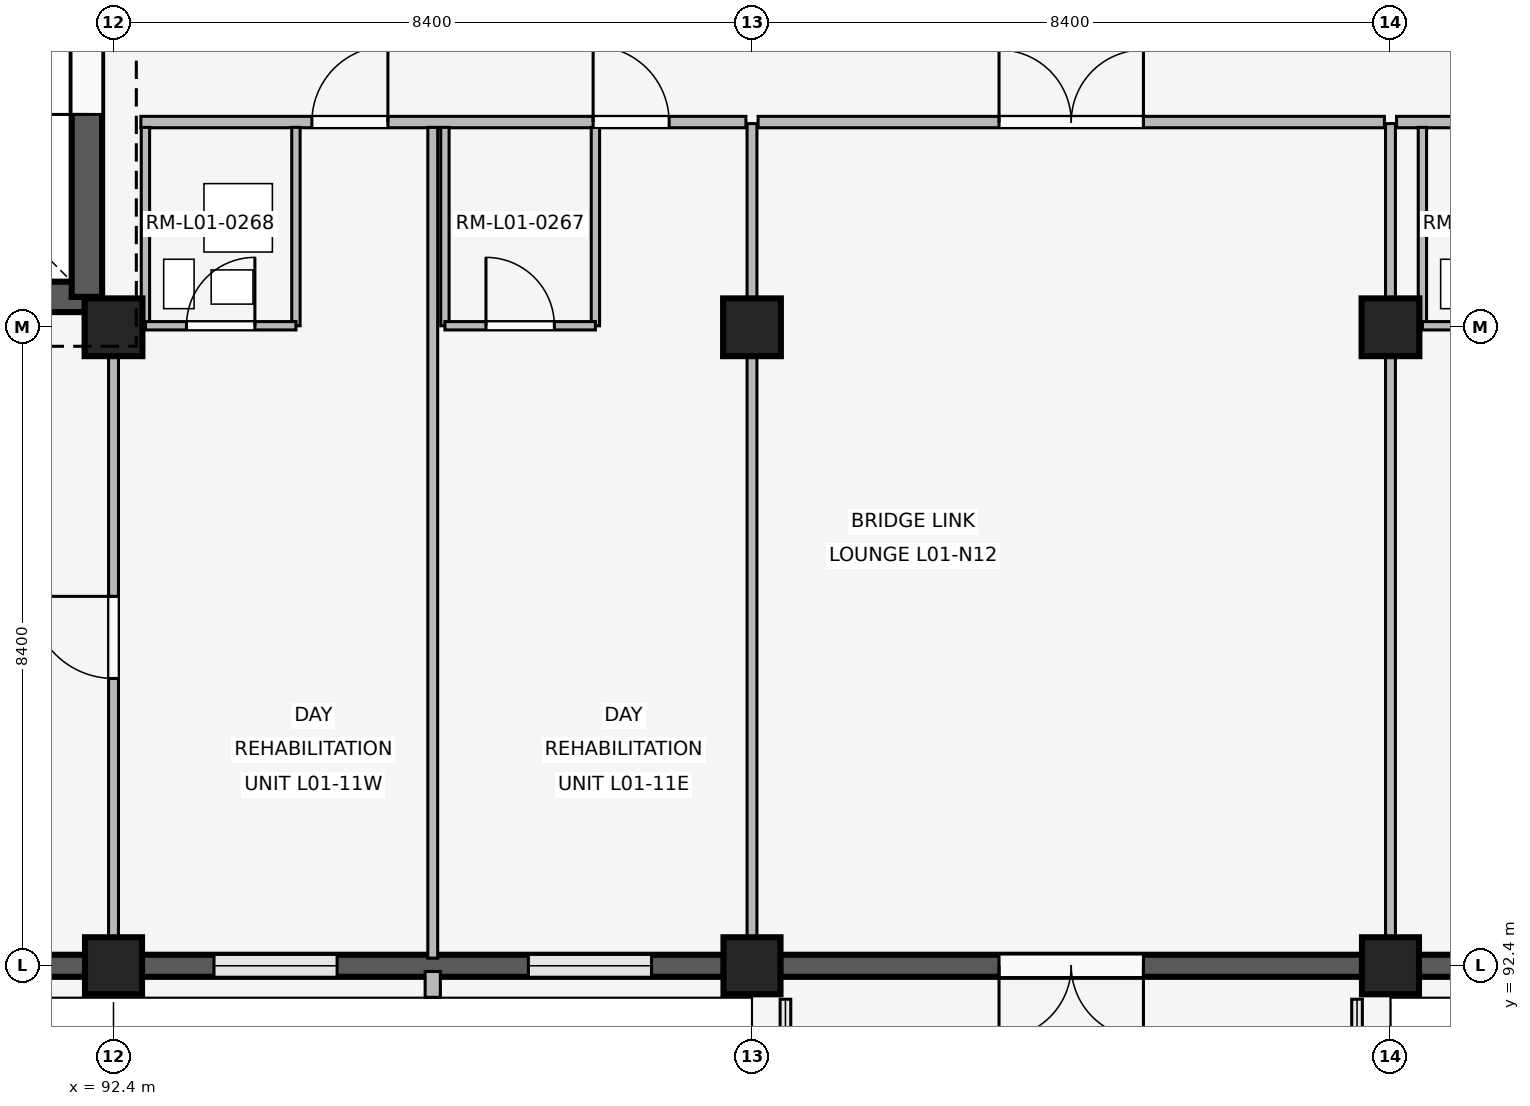
"""IFC4 building model, lengths in metres.
Left out: names, types, materials, properties, quantities, classifications, styles, units other than length and angle.
Written with IfcOpenShell. Run it as: python <this file> out.ifc"""

import sys

from ifc_helpers import new_model, si_unit, direction, frame, frame_2d, origin, origin_2d, place, context, subcontext, project, spatial, rectangle, extrude, element, fill, save


model = new_model("IFC4")
c1 = context("Model", 3, precision=1e-05, world=origin(), true_north=direction((0.0, 1.0)))
c2 = subcontext(c1, "Body", "Model", "MODEL_VIEW")
j1 = project(units=[si_unit("LENGTHUNIT", "METRE"), si_unit("PLANEANGLEUNIT", "RADIAN")], contexts=[c1])
p1 = place(None, origin())
s1 = spatial("IfcSite", under=j1, at=p1, CompositionType="ELEMENT")
p2 = place(p1, origin())
s2 = spatial("IfcBuilding", under=s1, at=p2, CompositionType="ELEMENT")
p3 = place(p2, frame((0.0, 0.0, 4.8)))
s3 = spatial("IfcBuildingStorey", under=s2, at=p3, CompositionType="ELEMENT", Elevation=4.8)
p4 = place(p3, frame((92.4, 92.4, 0.0), z_axis=(0.0, 0.0, 1.0), x_axis=(1.0, 0.0, 0.0)))
e1 = element("IfcColumn", 1, at=p4, inside=s3, PredefinedType="COLUMN", context=c2, shape_type="SweptSolid", body=[
    extrude(rectangle(XDim=0.75, YDim=0.75, at=origin_2d()), origin(), (0.0, 0.0, 1.0), 3.3),
])
p5 = place(p3, frame((92.4, 100.8, 0.0), z_axis=(0.0, 0.0, 1.0), x_axis=(1.0, 0.0, 0.0)))
e2 = element("IfcColumn", 2, at=p5, inside=s3, PredefinedType="COLUMN", context=c2, shape_type="SweptSolid", body=[
    extrude(rectangle(XDim=0.76, YDim=0.76, at=origin_2d()), origin(), (0.0, 0.0, 1.0), 3.3),
])
p6 = place(p3, frame((100.8, 92.4, 0.0), z_axis=(0.0, 0.0, 1.0), x_axis=(1.0, 0.0, 0.0)))
e3 = element("IfcColumn", 3, at=p6, inside=s3, PredefinedType="COLUMN", context=c2, shape_type="SweptSolid", body=[
    extrude(rectangle(XDim=0.75, YDim=0.75, at=origin_2d()), origin(), (0.0, 0.0, 1.0), 3.3),
])
p7 = place(p3, frame((100.8, 100.8, 0.0), z_axis=(0.0, 0.0, 1.0), x_axis=(1.0, 0.0, 0.0)))
e4 = element("IfcColumn", 4, at=p7, inside=s3, PredefinedType="COLUMN", context=c2, shape_type="SweptSolid", body=[
    extrude(rectangle(XDim=0.76, YDim=0.76, at=origin_2d()), origin(), (0.0, 0.0, 1.0), 3.3),
])
p8 = place(p3, frame((109.2, 92.4, 0.0), z_axis=(0.0, 0.0, 1.0), x_axis=(1.0, 0.0, 0.0)))
e5 = element("IfcColumn", 5, at=p8, inside=s3, PredefinedType="COLUMN", context=c2, shape_type="SweptSolid", body=[
    extrude(rectangle(XDim=0.75, YDim=0.75, at=origin_2d()), origin(), (0.0, 0.0, 1.0), 3.3),
])
p9 = place(p3, frame((109.2, 100.8, 0.0), z_axis=(0.0, 0.0, 1.0), x_axis=(1.0, 0.0, 0.0)))
e6 = element("IfcColumn", 6, at=p9, inside=s3, PredefinedType="COLUMN", context=c2, shape_type="SweptSolid", body=[
    extrude(rectangle(XDim=0.76, YDim=0.76, at=origin_2d()), origin(), (0.0, 0.0, 1.0), 3.3),
])
p10 = place(p3, frame((92.03, 92.4, 0.0), z_axis=(0.0, 0.0, 1.0), x_axis=(-1.0, 0.0, 0.0)))
e7 = element("IfcWall", 7, at=p10, inside=s3, PredefinedType="SOLIDWALL", context=c2, shape_type="SweptSolid", body=[
    extrude(rectangle(XDim=7.66, YDim=0.29, at=frame_2d((3.83, 0.0))), origin(), (0.0, 0.0, 1.0), 2.42),
])
p11 = place(p10, frame((1.032, 0.0, 0.85)))
e8 = element("IfcOpeningElement", 8, at=p11, cuts=e7, PredefinedType="OPENING", context=c2, shape_type="SweptSolid", body=[
    extrude(rectangle(XDim=1.46, YDim=0.85, at=frame_2d((0.73, 0.425))), frame((0.0, 0.155, 0.0), z_axis=(0.0, -1.0, 0.0), x_axis=(1.0, 0.0, 0.0)), (0.0, 0.0, 1.0), 0.31),
])
p12 = place(p10, frame((5.168, 0.0, 0.85)))
e9 = element("IfcOpeningElement", 9, at=p12, cuts=e7, PredefinedType="OPENING", context=c2, shape_type="SweptSolid", body=[
    extrude(rectangle(XDim=1.46, YDim=0.85, at=frame_2d((0.73, 0.425))), frame((0.0, 0.155, 0.0), z_axis=(0.0, -1.0, 0.0), x_axis=(1.0, 0.0, 0.0)), (0.0, 0.0, 1.0), 0.31),
])
p13 = place(p3, frame((100.43, 92.4, 0.0), z_axis=(0.0, 0.0, 1.0), x_axis=(-1.0, 0.0, 0.0)))
e10 = element("IfcWall", 10, at=p13, inside=s3, PredefinedType="SOLIDWALL", context=c2, shape_type="SweptSolid", body=[
    extrude(rectangle(XDim=7.66, YDim=0.29, at=frame_2d((3.83, 0.0))), origin(), (0.0, 0.0, 1.0), 2.42),
])
p14 = place(p13, frame((0.952, 0.0, 0.85)))
e11 = element("IfcOpeningElement", 11, at=p14, cuts=e10, PredefinedType="OPENING", context=c2, shape_type="SweptSolid", body=[
    extrude(rectangle(XDim=1.62, YDim=0.95, at=frame_2d((0.81, 0.475))), frame((0.0, 0.155, 0.0), z_axis=(0.0, -1.0, 0.0), x_axis=(1.0, 0.0, 0.0)), (0.0, 0.0, 1.0), 0.31),
])
p15 = place(p13, frame((5.088, 0.0, 0.85)))
e12 = element("IfcOpeningElement", 12, at=p15, cuts=e10, PredefinedType="OPENING", context=c2, shape_type="SweptSolid", body=[
    extrude(rectangle(XDim=1.62, YDim=0.95, at=frame_2d((0.81, 0.475))), frame((0.0, 0.155, 0.0), z_axis=(0.0, -1.0, 0.0), x_axis=(1.0, 0.0, 0.0)), (0.0, 0.0, 1.0), 0.31),
])
p16 = place(p3, frame((96.6, 92.325, 0.0), z_axis=(0.0, 0.0, 1.0), x_axis=(0.0, -1.0, 0.0)))
e13 = element("IfcWall", 13, at=p16, inside=s3, PredefinedType="ELEMENTEDWALL", context=c2, shape_type="SweptSolid", body=[
    extrude(rectangle(XDim=0.34, YDim=0.2, at=frame_2d((0.17, 0.0))), origin(), (0.0, 0.0, 1.0), 2.4),
])
p17 = place(p3, frame((108.83, 92.4, 0.0), z_axis=(0.0, 0.0, 1.0), x_axis=(-1.0, 0.0, 0.0)))
e14 = element("IfcWall", 14, at=p17, inside=s3, PredefinedType="SOLIDWALL", context=c2, shape_type="SweptSolid", body=[
    extrude(rectangle(XDim=7.66, YDim=0.29, at=frame_2d((3.83, 0.0))), origin(), (0.0, 0.0, 1.0), 2.42),
])
p18 = place(p17, frame((2.88, 0.0, 0.0)))
e15 = element("IfcOpeningElement", 15, at=p18, cuts=e14, PredefinedType="OPENING", context=c2, shape_type="SweptSolid", body=[
    extrude(rectangle(XDim=1.9, YDim=2.3, at=frame_2d((0.95, 1.15))), frame((0.0, 0.155, 0.0), z_axis=(0.0, -1.0, 0.0), x_axis=(1.0, 0.0, 0.0)), (0.0, 0.0, 1.0), 0.31),
])
p19 = place(p3, frame((117.23, 92.4, 0.0), z_axis=(0.0, 0.0, 1.0), x_axis=(-1.0, 0.0, 0.0)))
e16 = element("IfcWall", 16, at=p19, inside=s3, PredefinedType="SOLIDWALL", context=c2, shape_type="SweptSolid", body=[
    extrude(rectangle(XDim=7.66, YDim=0.29, at=frame_2d((3.83, 0.0))), origin(), (0.0, 0.0, 1.0), 2.42),
])
p20 = place(p19, frame((0.952, 0.0, 0.85)))
e17 = element("IfcOpeningElement", 17, at=p20, cuts=e16, PredefinedType="OPENING", context=c2, shape_type="SweptSolid", body=[
    extrude(rectangle(XDim=1.62, YDim=0.95, at=frame_2d((0.81, 0.475))), frame((0.0, 0.155, 0.0), z_axis=(0.0, -1.0, 0.0), x_axis=(1.0, 0.0, 0.0)), (0.0, 0.0, 1.0), 0.31),
])
p21 = place(p19, frame((5.088, 0.0, 0.85)))
e18 = element("IfcOpeningElement", 18, at=p21, cuts=e16, PredefinedType="OPENING", context=c2, shape_type="SweptSolid", body=[
    extrude(rectangle(XDim=1.62, YDim=0.95, at=frame_2d((0.81, 0.475))), frame((0.0, 0.155, 0.0), z_axis=(0.0, -1.0, 0.0), x_axis=(1.0, 0.0, 0.0)), (0.0, 0.0, 1.0), 0.31),
])
p22 = place(p3, frame((84.55, 101.2, 0.0), z_axis=(0.0, 0.0, 1.0), x_axis=(1.0, 0.0, 0.0)))
e19 = element("IfcWall", 19, at=p22, inside=s3, PredefinedType="SHEAR", context=c2, shape_type="SweptSolid", body=[
    extrude(rectangle(XDim=7.5, YDim=0.4, at=frame_2d((3.75, 0.0))), origin(), (0.0, 0.0, 1.0), 3.02),
])
p23 = place(p22, frame((4.85, 0.0, 0.0)))
e20 = element("IfcOpeningElement", 20, at=p23, cuts=e19, PredefinedType="OPENING", context=c2, shape_type="SweptSolid", body=[
    extrude(rectangle(XDim=1.2, YDim=2.1, at=frame_2d((0.6, 1.05))), frame((0.0, 0.21, 0.0), z_axis=(0.0, -1.0, 0.0), x_axis=(1.0, 0.0, 0.0)), (0.0, 0.0, 1.0), 0.42),
])
p24 = place(p3, frame((92.05, 101.2, 0.0), z_axis=(0.0, 0.0, 1.0), x_axis=(0.0, 1.0, 0.0)))
e21 = element("IfcWall", 21, at=p24, inside=s3, PredefinedType="SHEAR", context=c2, shape_type="SweptSolid", body=[
    extrude(rectangle(XDim=7.55, YDim=0.4, at=frame_2d((3.775, 0.0))), origin(), (0.0, 0.0, 1.0), 3.02),
])
p25 = place(p24, frame((2.4, 0.0, 0.0)))
e22 = element("IfcOpeningElement", 22, at=p25, cuts=e21, PredefinedType="OPENING", context=c2, shape_type="SweptSolid", body=[
    extrude(rectangle(XDim=1.2, YDim=2.2, at=frame_2d((0.6, 1.1))), frame((0.0, 0.21, 0.0), z_axis=(0.0, -1.0, 0.0), x_axis=(1.0, 0.0, 0.0)), (0.0, 0.0, 1.0), 0.42),
])
p26 = place(p3, frame((92.4, 92.54, 0.0), z_axis=(0.0, 0.0, 1.0), x_axis=(0.0, 1.0, 0.0)))
e23 = element("IfcWall", 23, at=p26, inside=s3, PredefinedType="PARTITIONING", context=c2, shape_type="SweptSolid", body=[
    extrude(rectangle(XDim=8.21, YDim=0.13, at=frame_2d((4.105, 0.0))), origin(), (0.0, 0.0, 1.0), 2.4),
])
p27 = place(p26, frame((3.64, 0.0, 0.0)))
e24 = element("IfcOpeningElement", 24, at=p27, cuts=e23, PredefinedType="OPENING", context=c2, shape_type="SweptSolid", body=[
    extrude(rectangle(XDim=1.08, YDim=2.15, at=frame_2d((0.54, 1.075))), frame((0.0, 0.075, 0.0), z_axis=(0.0, -1.0, 0.0), x_axis=(1.0, 0.0, 0.0)), (0.0, 0.0, 1.0), 0.15),
])
p28 = place(p3, frame((92.76, 103.5, 0.0), z_axis=(0.0, 0.0, 1.0), x_axis=(1.0, 0.0, 0.0)))
e25 = element("IfcWall", 25, at=p28, inside=s3, PredefinedType="PARTITIONING", context=c2, shape_type="SweptSolid", body=[
    extrude(rectangle(XDim=7.96, YDim=0.15, at=frame_2d((3.98, 0.0))), origin(), (0.0, 0.0, 1.0), 2.4),
])
p29 = place(p28, frame((2.25, 0.0, 0.0)))
e26 = element("IfcOpeningElement", 26, at=p29, cuts=e25, PredefinedType="OPENING", context=c2, shape_type="SweptSolid", body=[
    extrude(rectangle(XDim=1.0, YDim=2.15, at=frame_2d((0.5, 1.075))), frame((0.0, 0.085, 0.0), z_axis=(0.0, -1.0, 0.0), x_axis=(1.0, 0.0, 0.0)), (0.0, 0.0, 1.0), 0.17),
])
p30 = place(p28, frame((5.95, 0.0, 0.0)))
e27 = element("IfcOpeningElement", 27, at=p30, cuts=e25, PredefinedType="OPENING", context=c2, shape_type="SweptSolid", body=[
    extrude(rectangle(XDim=1.0, YDim=2.15, at=frame_2d((0.5, 1.075))), frame((0.0, 0.085, 0.0), z_axis=(0.0, -1.0, 0.0), x_axis=(1.0, 0.0, 0.0)), (0.0, 0.0, 1.0), 0.17),
])
p31 = place(p3, frame((96.6, 92.5, 0.0), z_axis=(0.0, 0.0, 1.0), x_axis=(0.0, 1.0, 0.0)))
e28 = element("IfcWall", 28, at=p31, inside=s3, PredefinedType="PARTITIONING", context=c2, shape_type="SweptSolid", body=[
    extrude(rectangle(XDim=10.93, YDim=0.13, at=frame_2d((5.465, 0.0))), origin(), (0.0, 0.0, 1.0), 2.4),
])
for number, where, z_axis, x_axis in (
    (29, (92.82, 100.82, 0.0), (0.0, 0.0, 1.0), (0.0, 1.0, 0.0)),
    (30, (94.8, 100.82, 0.0), (0.0, 0.0, 1.0), (0.0, 1.0, 0.0)),
):
    element("IfcWall", number, at=place(p3, frame(where, z_axis=z_axis, x_axis=x_axis)), inside=s3, PredefinedType="PARTITIONING", context=c2, shape_type="SweptSolid", body=[
        extrude(rectangle(XDim=2.61, YDim=0.11, at=frame_2d((1.305, 0.0))), origin(), (0.0, 0.0, 1.0), 2.4),
    ])
p32 = place(p3, frame((92.82, 100.82, 0.0), z_axis=(0.0, 0.0, 1.0), x_axis=(1.0, 0.0, 0.0)))
e31 = element("IfcWall", 31, at=p32, inside=s3, PredefinedType="PARTITIONING", context=c2, shape_type="SweptSolid", body=[
    extrude(rectangle(XDim=1.98, YDim=0.11, at=frame_2d((0.99, 0.0))), origin(), (0.0, 0.0, 1.0), 2.4),
])
p33 = place(p32, frame((0.54, 0.0, 0.0)))
e32 = element("IfcOpeningElement", 32, at=p33, cuts=e31, PredefinedType="OPENING", context=c2, shape_type="SweptSolid", body=[
    extrude(rectangle(XDim=0.9, YDim=2.1, at=frame_2d((0.45, 1.05))), frame((0.0, 0.065, 0.0), z_axis=(0.0, -1.0, 0.0), x_axis=(1.0, 0.0, 0.0)), (0.0, 0.0, 1.0), 0.13),
])
for number, where, z_axis, x_axis in (
    (33, (96.76, 100.82, 0.0), (0.0, 0.0, 1.0), (0.0, 1.0, 0.0)),
    (34, (98.74, 100.82, 0.0), (0.0, 0.0, 1.0), (0.0, 1.0, 0.0)),
):
    element("IfcWall", number, at=place(p3, frame(where, z_axis=z_axis, x_axis=x_axis)), inside=s3, PredefinedType="PARTITIONING", context=c2, shape_type="SweptSolid", body=[
        extrude(rectangle(XDim=2.61, YDim=0.11, at=frame_2d((1.305, 0.0))), origin(), (0.0, 0.0, 1.0), 2.4),
    ])
p34 = place(p3, frame((96.76, 100.82, 0.0), z_axis=(0.0, 0.0, 1.0), x_axis=(1.0, 0.0, 0.0)))
e35 = element("IfcWall", 35, at=p34, inside=s3, PredefinedType="PARTITIONING", context=c2, shape_type="SweptSolid", body=[
    extrude(rectangle(XDim=1.98, YDim=0.11, at=frame_2d((0.99, 0.0))), origin(), (0.0, 0.0, 1.0), 2.4),
])
p35 = place(p34, frame((0.54, 0.0, 0.0)))
e36 = element("IfcOpeningElement", 36, at=p35, cuts=e35, PredefinedType="OPENING", context=c2, shape_type="SweptSolid", body=[
    extrude(rectangle(XDim=0.9, YDim=2.1, at=frame_2d((0.45, 1.05))), frame((0.0, 0.065, 0.0), z_axis=(0.0, -1.0, 0.0), x_axis=(1.0, 0.0, 0.0)), (0.0, 0.0, 1.0), 0.13),
])
p36 = place(p3, frame((100.8, 92.54, 0.0), z_axis=(0.0, 0.0, 1.0), x_axis=(0.0, 1.0, 0.0)))
e37 = element("IfcWall", 37, at=p36, inside=s3, PredefinedType="PARTITIONING", context=c2, shape_type="SweptSolid", body=[
    extrude(rectangle(XDim=10.94, YDim=0.13, at=frame_2d((5.47, 0.0))), origin(), (0.0, 0.0, 1.0), 2.4),
])
p37 = place(p3, frame((100.88, 103.5, 0.0), z_axis=(0.0, 0.0, 1.0), x_axis=(1.0, 0.0, 0.0)))
e38 = element("IfcWall", 38, at=p37, inside=s3, PredefinedType="PARTITIONING", context=c2, shape_type="SweptSolid", body=[
    extrude(rectangle(XDim=8.24, YDim=0.15, at=frame_2d((4.12, 0.0))), origin(), (0.0, 0.0, 1.0), 2.4),
])
p38 = place(p37, frame((3.17, 0.0, 0.0)))
e39 = element("IfcOpeningElement", 39, at=p38, cuts=e38, PredefinedType="OPENING", context=c2, shape_type="SweptSolid", body=[
    extrude(rectangle(XDim=1.9, YDim=2.3, at=frame_2d((0.95, 1.15))), frame((0.0, 0.085, 0.0), z_axis=(0.0, -1.0, 0.0), x_axis=(1.0, 0.0, 0.0)), (0.0, 0.0, 1.0), 0.17),
])
p39 = place(p3, frame((109.2, 92.54, 0.0), z_axis=(0.0, 0.0, 1.0), x_axis=(0.0, 1.0, 0.0)))
e40 = element("IfcWall", 40, at=p39, inside=s3, PredefinedType="PARTITIONING", context=c2, shape_type="SweptSolid", body=[
    extrude(rectangle(XDim=10.94, YDim=0.13, at=frame_2d((5.47, 0.0))), origin(), (0.0, 0.0, 1.0), 2.4),
])
p40 = place(p3, frame((109.28, 103.5, 0.0), z_axis=(0.0, 0.0, 1.0), x_axis=(1.0, 0.0, 0.0)))
e41 = element("IfcWall", 41, at=p40, inside=s3, PredefinedType="PARTITIONING", context=c2, shape_type="SweptSolid", body=[
    extrude(rectangle(XDim=8.24, YDim=0.15, at=frame_2d((4.12, 0.0))), origin(), (0.0, 0.0, 1.0), 2.4),
])
p41 = place(p40, frame((2.53, 0.0, 0.0)))
e42 = element("IfcOpeningElement", 42, at=p41, cuts=e41, PredefinedType="OPENING", context=c2, shape_type="SweptSolid", body=[
    extrude(rectangle(XDim=1.0, YDim=2.15, at=frame_2d((0.5, 1.075))), frame((0.0, 0.085, 0.0), z_axis=(0.0, -1.0, 0.0), x_axis=(1.0, 0.0, 0.0)), (0.0, 0.0, 1.0), 0.17),
])
p42 = place(p40, frame((6.23, 0.0, 0.0)))
e43 = element("IfcOpeningElement", 43, at=p42, cuts=e41, PredefinedType="OPENING", context=c2, shape_type="SweptSolid", body=[
    extrude(rectangle(XDim=1.0, YDim=2.15, at=frame_2d((0.5, 1.075))), frame((0.0, 0.085, 0.0), z_axis=(0.0, -1.0, 0.0), x_axis=(1.0, 0.0, 0.0)), (0.0, 0.0, 1.0), 0.17),
])
p43 = place(p3, frame((109.62, 100.82, 0.0), z_axis=(0.0, 0.0, 1.0), x_axis=(0.0, 1.0, 0.0)))
e44 = element("IfcWall", 44, at=p43, inside=s3, PredefinedType="PARTITIONING", context=c2, shape_type="SweptSolid", body=[
    extrude(rectangle(XDim=2.61, YDim=0.11, at=frame_2d((1.305, 0.0))), origin(), (0.0, 0.0, 1.0), 2.4),
])
p44 = place(p3, frame((109.62, 100.82, 0.0), z_axis=(0.0, 0.0, 1.0), x_axis=(1.0, 0.0, 0.0)))
e45 = element("IfcWall", 45, at=p44, inside=s3, PredefinedType="PARTITIONING", context=c2, shape_type="SweptSolid", body=[
    extrude(rectangle(XDim=1.98, YDim=0.11, at=frame_2d((0.99, 0.0))), origin(), (0.0, 0.0, 1.0), 2.4),
])
p45 = place(p44, frame((0.54, 0.0, 0.0)))
e46 = element("IfcOpeningElement", 46, at=p45, cuts=e45, PredefinedType="OPENING", context=c2, shape_type="SweptSolid", body=[
    extrude(rectangle(XDim=0.9, YDim=2.1, at=frame_2d((0.45, 1.05))), frame((0.0, 0.065, 0.0), z_axis=(0.0, -1.0, 0.0), x_axis=(1.0, 0.0, 0.0)), (0.0, 0.0, 1.0), 0.13),
])
p46 = place(p14, origin())
e47 = element("IfcWindow", 47, at=p46, inside=s3, PartitioningType="SINGLE_PANEL", PredefinedType="WINDOW", context=c2, shape_type="SweptSolid", body=[
    extrude(rectangle(XDim=1.62, YDim=0.95, at=frame_2d((0.81, 0.475))), frame((0.0, 0.03, 0.0), z_axis=(0.0, -1.0, 0.0), x_axis=(1.0, 0.0, 0.0)), (0.0, 0.0, 1.0), 0.06),
])
fill(e11, e47)
p47 = place(p15, origin())
e48 = element("IfcWindow", 48, at=p47, inside=s3, PartitioningType="SINGLE_PANEL", PredefinedType="WINDOW", context=c2, shape_type="SweptSolid", body=[
    extrude(rectangle(XDim=1.62, YDim=0.95, at=frame_2d((0.81, 0.475))), frame((0.0, 0.03, 0.0), z_axis=(0.0, -1.0, 0.0), x_axis=(1.0, 0.0, 0.0)), (0.0, 0.0, 1.0), 0.06),
])
fill(e12, e48)
p48 = place(p18, origin())
e49 = element("IfcDoor", 49, at=p48, inside=s3, OperationType="DOUBLE_SWING_LEFT", PredefinedType="DOOR", context=c2, shape_type="SweptSolid", body=[
    extrude(rectangle(XDim=1.9, YDim=2.3, at=frame_2d((0.95, 1.15))), frame((0.0, 0.025, 0.0), z_axis=(0.0, -1.0, 0.0), x_axis=(1.0, 0.0, 0.0)), (0.0, 0.0, 1.0), 0.05),
])
fill(e15, e49)
p49 = place(p25, origin())
e50 = element("IfcDoor", 50, at=p49, inside=s3, OperationType="SINGLE_SWING_LEFT", PredefinedType="DOOR", context=c2, shape_type="SweptSolid", body=[
    extrude(rectangle(XDim=1.2, YDim=2.2, at=frame_2d((0.6, 1.1))), frame((0.0, 0.025, 0.0), z_axis=(0.0, -1.0, 0.0), x_axis=(1.0, 0.0, 0.0)), (0.0, 0.0, 1.0), 0.05),
])
fill(e22, e50)
p50 = place(p27, origin())
e51 = element("IfcDoor", 51, at=p50, inside=s3, OperationType="SINGLE_SWING_RIGHT", PredefinedType="DOOR", context=c2, shape_type="SweptSolid", body=[
    extrude(rectangle(XDim=1.08, YDim=2.15, at=frame_2d((0.54, 1.075))), frame((0.0, 0.025, 0.0), z_axis=(0.0, -1.0, 0.0), x_axis=(1.0, 0.0, 0.0)), (0.0, 0.0, 1.0), 0.05),
])
fill(e24, e51)
p51 = place(p29, origin())
e52 = element("IfcDoor", 52, at=p51, inside=s3, OperationType="SINGLE_SWING_RIGHT", PredefinedType="DOOR", context=c2, shape_type="SweptSolid", body=[
    extrude(rectangle(XDim=1.0, YDim=2.15, at=frame_2d((0.5, 1.075))), frame((0.0, 0.025, 0.0), z_axis=(0.0, -1.0, 0.0), x_axis=(1.0, 0.0, 0.0)), (0.0, 0.0, 1.0), 0.05),
])
fill(e26, e52)
p52 = place(p30, origin())
e53 = element("IfcDoor", 53, at=p52, inside=s3, OperationType="SINGLE_SWING_LEFT", PredefinedType="DOOR", context=c2, shape_type="SweptSolid", body=[
    extrude(rectangle(XDim=1.0, YDim=2.15, at=frame_2d((0.5, 1.075))), frame((0.0, 0.025, 0.0), z_axis=(0.0, -1.0, 0.0), x_axis=(1.0, 0.0, 0.0)), (0.0, 0.0, 1.0), 0.05),
])
fill(e27, e53)
p53 = place(p33, origin())
e54 = element("IfcDoor", 54, at=p53, inside=s3, OperationType="SINGLE_SWING_RIGHT", PredefinedType="DOOR", context=c2, shape_type="SweptSolid", body=[
    extrude(rectangle(XDim=0.9, YDim=2.1, at=frame_2d((0.45, 1.05))), frame((0.0, 0.025, 0.0), z_axis=(0.0, -1.0, 0.0), x_axis=(1.0, 0.0, 0.0)), (0.0, 0.0, 1.0), 0.05),
])
fill(e32, e54)
p54 = place(p35, origin())
e55 = element("IfcDoor", 55, at=p54, inside=s3, OperationType="SINGLE_SWING_LEFT", PredefinedType="DOOR", context=c2, shape_type="SweptSolid", body=[
    extrude(rectangle(XDim=0.9, YDim=2.1, at=frame_2d((0.45, 1.05))), frame((0.0, 0.025, 0.0), z_axis=(0.0, -1.0, 0.0), x_axis=(1.0, 0.0, 0.0)), (0.0, 0.0, 1.0), 0.05),
])
fill(e36, e55)
p55 = place(p38, origin())
e56 = element("IfcDoor", 56, at=p55, inside=s3, OperationType="DOUBLE_SWING_LEFT", PredefinedType="DOOR", context=c2, shape_type="SweptSolid", body=[
    extrude(rectangle(XDim=1.9, YDim=2.3, at=frame_2d((0.95, 1.15))), frame((0.0, 0.025, 0.0), z_axis=(0.0, -1.0, 0.0), x_axis=(1.0, 0.0, 0.0)), (0.0, 0.0, 1.0), 0.05),
])
fill(e39, e56)
save(model, sys.argv[1])
